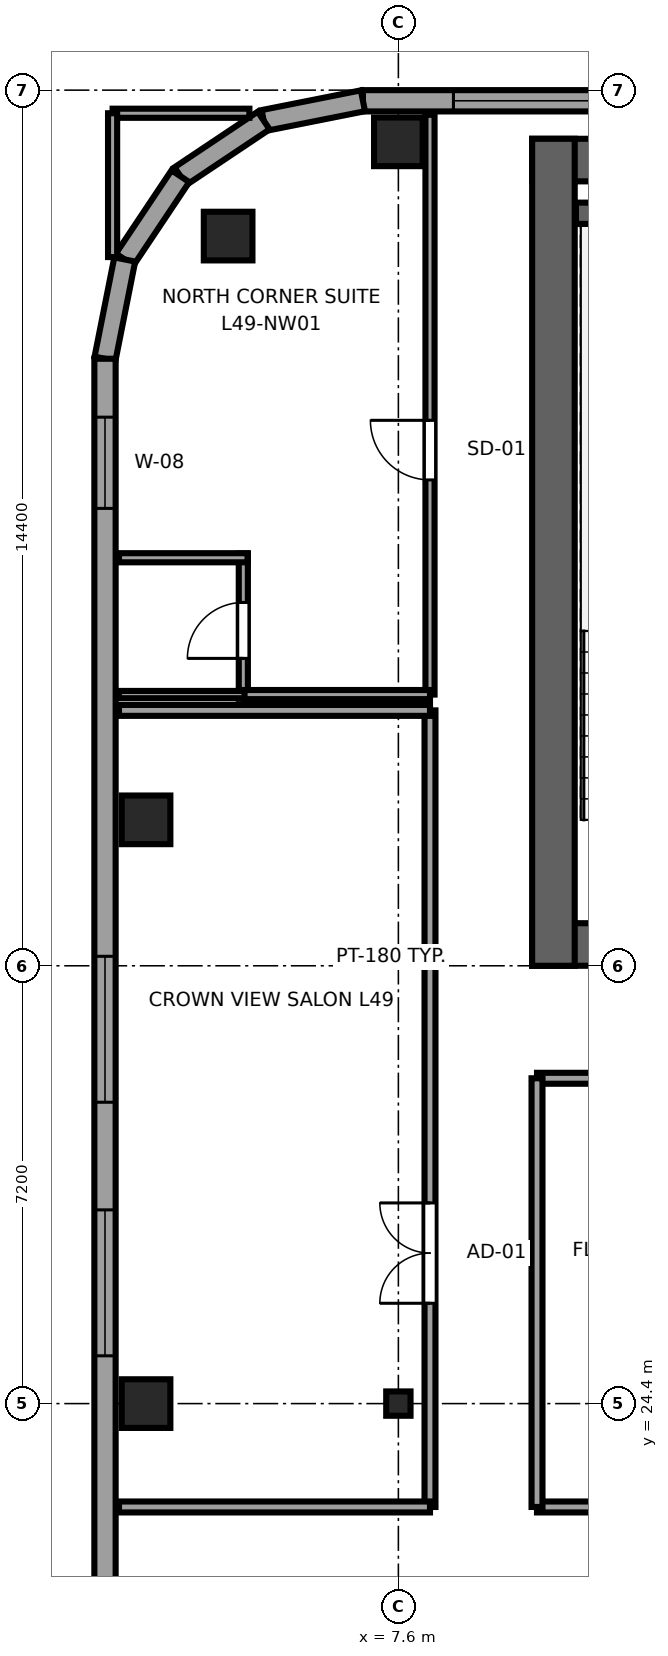
"""IFC4 building model, lengths in metres.
Left out: names, types, materials, properties, quantities, classifications, styles, units other than length and angle.
Written with IfcOpenShell. Run it as: python <this file> out.ifc"""

import sys

from ifc_helpers import new_model, si_unit, direction, frame, frame_2d, origin, origin_2d, place, context, subcontext, project, spatial, rectangle, i_section, extrude, source, transform, mapped, element, fill, save


model = new_model("IFC4")
c1 = context("Model", 3, precision=1e-05, world=origin(), true_north=direction((0.0, 1.0)))
c2 = subcontext(c1, "Body", "Model", "MODEL_VIEW")
j1 = project(units=[si_unit("LENGTHUNIT", "METRE"), si_unit("PLANEANGLEUNIT", "RADIAN")], contexts=[c1])
p1 = place(None, origin())
s1 = spatial("IfcSite", under=j1, at=p1, CompositionType="ELEMENT")
p2 = place(p1, origin())
s2 = spatial("IfcBuilding", under=s1, at=p2, CompositionType="ELEMENT")
p3 = place(p2, frame((0.0, 0.0, 187.55)))
s3 = spatial("IfcBuildingStorey", under=s2, at=p3, CompositionType="ELEMENT", Elevation=187.55)
p4 = place(p3, frame((9.8, 31.95, 0.0), z_axis=(0.0, 0.0, 1.0), x_axis=(1.0, 0.0, 0.0)))
e1 = element("IfcWall", 1, at=p4, inside=s3, PredefinedType="SHEAR", context=c2, shape_type="SweptSolid", body=[
    extrude(rectangle(XDim=26.4, YDim=0.7, at=frame_2d((13.2, 0.0))), origin(), (0.0, 0.0, 1.0), 3.55),
])
p5 = place(p4, frame((6.32, 0.0, 0.0), z_axis=(0.0, 0.0, 1.0), x_axis=(-1.0, 0.0, 0.0)))
e2 = element("IfcOpeningElement", 2, at=p5, cuts=e1, PredefinedType="OPENING", context=c2, shape_type="SweptSolid", body=[
    extrude(rectangle(XDim=1.5, YDim=2.04, at=frame_2d((0.75, 1.02))), frame((0.0, 0.36, 0.0), z_axis=(0.0, -1.0, 0.0), x_axis=(1.0, 0.0, 0.0)), (0.0, 0.0, 1.0), 0.72),
])
p6 = place(p4, frame((13.95, 0.0, 0.0), z_axis=(0.0, 0.0, 1.0), x_axis=(-1.0, 0.0, 0.0)))
e3 = element("IfcOpeningElement", 3, at=p6, cuts=e1, PredefinedType="OPENING", context=c2, shape_type="SweptSolid", body=[
    extrude(rectangle(XDim=1.5, YDim=2.04, at=frame_2d((0.75, 1.02))), frame((0.0, 0.36, 0.0), z_axis=(0.0, -1.0, 0.0), x_axis=(1.0, 0.0, 0.0)), (0.0, 0.0, 1.0), 0.72),
])
p7 = place(p4, frame((20.25, 0.0, 0.0), z_axis=(0.0, 0.0, 1.0), x_axis=(-1.0, 0.0, 0.0)))
e4 = element("IfcOpeningElement", 4, at=p7, cuts=e1, PredefinedType="OPENING", context=c2, shape_type="SweptSolid", body=[
    extrude(rectangle(XDim=1.5, YDim=2.04, at=frame_2d((0.75, 1.02))), frame((0.0, 0.36, 0.0), z_axis=(0.0, -1.0, 0.0), x_axis=(1.0, 0.0, 0.0)), (0.0, 0.0, 1.0), 0.72),
])
p8 = place(p4, frame((8.37, 0.0, 0.0), z_axis=(0.0, 0.0, 1.0), x_axis=(-1.0, 0.0, 0.0)))
e5 = element("IfcOpeningElement", 5, at=p8, cuts=e1, PredefinedType="OPENING", context=c2, shape_type="SweptSolid", body=[
    extrude(rectangle(XDim=0.82, YDim=2.01, at=frame_2d((0.41, 1.005))), frame((0.0, 0.36, 0.0), z_axis=(0.0, -1.0, 0.0), x_axis=(1.0, 0.0, 0.0)), (0.0, 0.0, 1.0), 0.72),
])
p9 = place(p3, frame((9.8, 44.85, 0.0), z_axis=(0.0, 0.0, 1.0), x_axis=(1.0, 0.0, 0.0)))
e6 = element("IfcWall", 6, at=p9, inside=s3, PredefinedType="SHEAR", context=c2, shape_type="SweptSolid", body=[
    extrude(rectangle(XDim=26.4, YDim=0.7, at=frame_2d((13.2, 0.0))), origin(), (0.0, 0.0, 1.0), 3.55),
])
p10 = place(p3, frame((10.15, 31.6, 0.0), z_axis=(0.0, 0.0, 1.0), x_axis=(0.0, 1.0, 0.0)))
e7 = element("IfcWall", 7, at=p10, inside=s3, PredefinedType="SHEAR", context=c2, shape_type="SweptSolid", body=[
    extrude(rectangle(XDim=13.6, YDim=0.7, at=frame_2d((6.8, 0.0))), origin(), (0.0, 0.0, 1.0), 3.55),
])
p11 = place(p3, frame((10.52, 43.975, 0.0), z_axis=(0.0, 0.0, 1.0), x_axis=(1.0, 0.0, 0.0)))
e8 = element("IfcWall", 8, at=p11, inside=s3, PredefinedType="SHEAR", context=c2, shape_type="SweptSolid", body=[
    extrude(rectangle(XDim=3.6, YDim=0.35, at=frame_2d((1.8, 0.0))), origin(), (0.0, 0.0, 1.0), 3.55),
])
m1 = source(origin(), c2, "Body", "SweptSolid", [
    extrude(rectangle(XDim=0.8, YDim=0.8, at=origin_2d()), origin(), (0.0, 0.0, 1.0), 3.55),
])
p12 = place(p3, frame((3.45, 24.4, 0.0), z_axis=(0.0, 0.0, 1.0), x_axis=(1.0, 0.0, 0.0)))
e9 = element("IfcColumn", 9, at=p12, inside=s3, PredefinedType="COLUMN", context=c2, shape_type="MappedRepresentation", body=[
    mapped(m1, transform((0.0, 0.0, 0.0), x_axis=(1.0, 0.0, 0.0), y_axis=(0.0, 1.0, 0.0), z_axis=(0.0, 0.0, 1.0), scale=1.0)),
])
m2 = source(origin(), c2, "Body", "SweptSolid", [
    extrude(i_section(OverallWidth=0.4, OverallDepth=0.4, WebThickness=0.02, FlangeThickness=0.035, at=origin_2d()), origin(), (0.0, 0.0, 1.0), 3.55),
])
p13 = place(p3, frame((7.6, 24.4, 0.0), z_axis=(0.0, 0.0, 1.0), x_axis=(1.0, 0.0, 0.0)))
e10 = element("IfcColumn", 10, at=p13, inside=s3, PredefinedType="COLUMN", context=c2, shape_type="MappedRepresentation", body=[
    mapped(m2, transform((0.0, 0.0, 0.0), x_axis=(1.0, 0.0, 0.0), y_axis=(0.0, 1.0, 0.0), z_axis=(0.0, 0.0, 1.0), scale=1.0)),
])
for number, where, z_axis, x_axis in (
    (11, (4.8, 43.6, 0.0), (0.0, 0.0, 1.0), (1.0, 0.0, 0.0)),
    (12, (7.6, 45.15, 0.0), (0.0, 0.0, 1.0), (1.0, 0.0, 0.0)),
    (13, (3.45, 34.0, 0.0), (0.0, 0.0, 1.0), (1.0, 0.0, 0.0)),
):
    element("IfcColumn", number, at=place(p3, frame(where, z_axis=z_axis, x_axis=x_axis)), inside=s3, PredefinedType="COLUMN", context=c2, shape_type="MappedRepresentation", body=[
        mapped(m1, transform((0.0, 0.0, 0.0), x_axis=(1.0, 0.0, 0.0), y_axis=(0.0, 1.0, 0.0), z_axis=(0.0, 0.0, 1.0), scale=1.0)),
    ])
p14 = place(p3, frame((49.983, 45.825, 0.0), z_axis=(0.0, 0.0, 1.0), x_axis=(-1.0, 0.0, 0.0)))
e14 = element("IfcWall", 14, at=p14, inside=s3, PredefinedType="SOLIDWALL", context=c2, shape_type="SweptSolid", body=[
    extrude(rectangle(XDim=42.966, YDim=0.35, at=frame_2d((21.483, 0.0))), origin(), (0.0, 0.0, 1.0), 3.37),
])
p15 = place(p14, frame((1.488, 0.0, 0.68)))
e15 = element("IfcOpeningElement", 15, at=p15, cuts=e14, PredefinedType="OPENING", context=c2, shape_type="SweptSolid", body=[
    extrude(rectangle(XDim=2.4, YDim=1.9, at=frame_2d((1.2, 0.95))), frame((0.0, 0.185, 0.0), z_axis=(0.0, -1.0, 0.0), x_axis=(1.0, 0.0, 0.0)), (0.0, 0.0, 1.0), 0.37),
])
p16 = place(p14, frame((9.841, 0.0, 0.68)))
e16 = element("IfcOpeningElement", 16, at=p16, cuts=e14, PredefinedType="OPENING", context=c2, shape_type="SweptSolid", body=[
    extrude(rectangle(XDim=2.4, YDim=1.9, at=frame_2d((1.2, 0.95))), frame((0.0, 0.185, 0.0), z_axis=(0.0, -1.0, 0.0), x_axis=(1.0, 0.0, 0.0)), (0.0, 0.0, 1.0), 0.37),
])
p17 = place(p14, frame((14.018, 0.0, 0.68)))
e17 = element("IfcOpeningElement", 17, at=p17, cuts=e14, PredefinedType="OPENING", context=c2, shape_type="SweptSolid", body=[
    extrude(rectangle(XDim=2.4, YDim=1.9, at=frame_2d((1.2, 0.95))), frame((0.0, 0.185, 0.0), z_axis=(0.0, -1.0, 0.0), x_axis=(1.0, 0.0, 0.0)), (0.0, 0.0, 1.0), 0.37),
])
p18 = place(p14, frame((18.195, 0.0, 0.68)))
e18 = element("IfcOpeningElement", 18, at=p18, cuts=e14, PredefinedType="OPENING", context=c2, shape_type="SweptSolid", body=[
    extrude(rectangle(XDim=2.4, YDim=1.9, at=frame_2d((1.2, 0.95))), frame((0.0, 0.185, 0.0), z_axis=(0.0, -1.0, 0.0), x_axis=(1.0, 0.0, 0.0)), (0.0, 0.0, 1.0), 0.37),
])
p19 = place(p14, frame((22.371, 0.0, 0.68)))
e19 = element("IfcOpeningElement", 19, at=p19, cuts=e14, PredefinedType="OPENING", context=c2, shape_type="SweptSolid", body=[
    extrude(rectangle(XDim=2.4, YDim=1.9, at=frame_2d((1.2, 0.95))), frame((0.0, 0.185, 0.0), z_axis=(0.0, -1.0, 0.0), x_axis=(1.0, 0.0, 0.0)), (0.0, 0.0, 1.0), 0.37),
])
p20 = place(p14, frame((26.548, 0.0, 0.68)))
e20 = element("IfcOpeningElement", 20, at=p20, cuts=e14, PredefinedType="OPENING", context=c2, shape_type="SweptSolid", body=[
    extrude(rectangle(XDim=2.4, YDim=1.9, at=frame_2d((1.2, 0.95))), frame((0.0, 0.185, 0.0), z_axis=(0.0, -1.0, 0.0), x_axis=(1.0, 0.0, 0.0)), (0.0, 0.0, 1.0), 0.37),
])
p21 = place(p14, frame((30.724, 0.0, 0.68)))
e21 = element("IfcOpeningElement", 21, at=p21, cuts=e14, PredefinedType="OPENING", context=c2, shape_type="SweptSolid", body=[
    extrude(rectangle(XDim=2.4, YDim=1.9, at=frame_2d((1.2, 0.95))), frame((0.0, 0.185, 0.0), z_axis=(0.0, -1.0, 0.0), x_axis=(1.0, 0.0, 0.0)), (0.0, 0.0, 1.0), 0.37),
])
p22 = place(p14, frame((34.901, 0.0, 0.68)))
e22 = element("IfcOpeningElement", 22, at=p22, cuts=e14, PredefinedType="OPENING", context=c2, shape_type="SweptSolid", body=[
    extrude(rectangle(XDim=2.4, YDim=1.9, at=frame_2d((1.2, 0.95))), frame((0.0, 0.185, 0.0), z_axis=(0.0, -1.0, 0.0), x_axis=(1.0, 0.0, 0.0)), (0.0, 0.0, 1.0), 0.37),
])
p23 = place(p14, frame((39.077, 0.0, 0.68)))
e23 = element("IfcOpeningElement", 23, at=p23, cuts=e14, PredefinedType="OPENING", context=c2, shape_type="SweptSolid", body=[
    extrude(rectangle(XDim=2.4, YDim=1.9, at=frame_2d((1.2, 0.95))), frame((0.0, 0.185, 0.0), z_axis=(0.0, -1.0, 0.0), x_axis=(1.0, 0.0, 0.0)), (0.0, 0.0, 1.0), 0.37),
])
p24 = place(p3, frame((7.017, 45.825, 0.0), z_axis=(0.0, 0.0, 1.0), x_axis=(-0.980788844421, -0.195072403631, 0.0)))
e24 = element("IfcWall", 24, at=p24, inside=s3, PredefinedType="SOLIDWALL", context=c2, shape_type="SweptSolid", body=[
    extrude(rectangle(XDim=1.665, YDim=0.35, at=frame_2d((0.832, 0.0))), origin(), (0.0, 0.0, 1.0), 3.37),
])
for number, where, z_axis, x_axis in (
    (25, (5.385, 45.5, 0.0), (0.0, 0.0, 1.0), (-0.832, -0.556, 0.0)),
    (26, (4.015, 44.585, 0.0), (0.0, 0.0, 1.0), (-0.556, -0.831, 0.0)),
):
    element("IfcWall", number, at=place(p3, frame(where, z_axis=z_axis, x_axis=x_axis)), inside=s3, PredefinedType="SOLIDWALL", context=c2, shape_type="SweptSolid", body=[
        extrude(rectangle(XDim=1.647, YDim=0.35, at=frame_2d((0.824, 0.0))), origin(), (0.0, 0.0, 1.0), 2.832),
    ])
p25 = place(p3, frame((3.1, 43.216, 0.0), z_axis=(0.0, 0.0, 1.0), x_axis=(-0.195044345786, -0.980794424524, 0.0)))
e27 = element("IfcWall", 27, at=p25, inside=s3, PredefinedType="SOLIDWALL", context=c2, shape_type="SweptSolid", body=[
    extrude(rectangle(XDim=1.665, YDim=0.35, at=frame_2d((0.833, 0.0))), origin(), (0.0, 0.0, 1.0), 3.37),
])
p26 = place(p3, frame((2.775, 41.583, 0.0), z_axis=(0.0, 0.0, 1.0), x_axis=(0.0, -1.0, 0.0)))
e28 = element("IfcWall", 28, at=p26, inside=s3, PredefinedType="SOLIDWALL", context=c2, shape_type="SweptSolid", body=[
    extrude(rectangle(XDim=34.566, YDim=0.35, at=frame_2d((17.283, 0.0))), origin(), (0.0, 0.0, 1.0), 3.37),
])
p27 = place(p26, frame((9.827, 0.0, 0.68)))
e29 = element("IfcOpeningElement", 29, at=p27, cuts=e28, PredefinedType="OPENING", context=c2, shape_type="SweptSolid", body=[
    extrude(rectangle(XDim=2.4, YDim=1.9, at=frame_2d((1.2, 0.95))), frame((0.0, 0.185, 0.0), z_axis=(0.0, -1.0, 0.0), x_axis=(1.0, 0.0, 0.0)), (0.0, 0.0, 1.0), 0.37),
])
p28 = place(p26, frame((13.997, 0.0, 0.68)))
e30 = element("IfcOpeningElement", 30, at=p28, cuts=e28, PredefinedType="OPENING", context=c2, shape_type="SweptSolid", body=[
    extrude(rectangle(XDim=2.4, YDim=1.9, at=frame_2d((1.2, 0.95))), frame((0.0, 0.185, 0.0), z_axis=(0.0, -1.0, 0.0), x_axis=(1.0, 0.0, 0.0)), (0.0, 0.0, 1.0), 0.37),
])
p29 = place(p26, frame((22.339, 0.0, 0.68)))
e31 = element("IfcOpeningElement", 31, at=p29, cuts=e28, PredefinedType="OPENING", context=c2, shape_type="SweptSolid", body=[
    extrude(rectangle(XDim=2.4, YDim=1.9, at=frame_2d((1.2, 0.95))), frame((0.0, 0.185, 0.0), z_axis=(0.0, -1.0, 0.0), x_axis=(1.0, 0.0, 0.0)), (0.0, 0.0, 1.0), 0.37),
])
p30 = place(p26, frame((26.51, 0.0, 0.68)))
e32 = element("IfcOpeningElement", 32, at=p30, cuts=e28, PredefinedType="OPENING", context=c2, shape_type="SweptSolid", body=[
    extrude(rectangle(XDim=2.4, YDim=1.9, at=frame_2d((1.2, 0.95))), frame((0.0, 0.185, 0.0), z_axis=(0.0, -1.0, 0.0), x_axis=(1.0, 0.0, 0.0)), (0.0, 0.0, 1.0), 0.37),
])
p31 = place(p26, frame((31.433, 0.0, 0.62)))
e33 = element("IfcOpeningElement", 33, at=p31, cuts=e28, PredefinedType="OPENING", context=c2, shape_type="SweptSolid", body=[
    extrude(rectangle(XDim=1.5, YDim=1.55, at=frame_2d((0.75, 0.775))), frame((0.0, 0.185, 0.0), z_axis=(0.0, -1.0, 0.0), x_axis=(1.0, 0.0, 0.0)), (0.0, 0.0, 1.0), 0.37),
])
p32 = place(p26, frame((0.961, 0.0, 0.62)))
e34 = element("IfcOpeningElement", 34, at=p32, cuts=e28, PredefinedType="OPENING", context=c2, shape_type="SweptSolid", body=[
    extrude(rectangle(XDim=1.5, YDim=1.55, at=frame_2d((0.75, 0.775))), frame((0.0, 0.185, 0.0), z_axis=(0.0, -1.0, 0.0), x_axis=(1.0, 0.0, 0.0)), (0.0, 0.0, 1.0), 0.37),
])
p33 = place(p3, frame((5.05, 35.99, 0.0), z_axis=(0.0, 0.0, 1.0), x_axis=(0.0, 1.0, 0.0)))
e35 = element("IfcWall", 35, at=p33, inside=s3, PredefinedType="PARTITIONING", context=c2, shape_type="SweptSolid", body=[
    extrude(rectangle(XDim=2.39, YDim=0.15, at=frame_2d((1.195, 0.0))), origin(), (0.0, 0.0, 1.0), 3.37),
])
p34 = place(p33, frame((0.665, 0.0, 0.0)))
e36 = element("IfcOpeningElement", 36, at=p34, cuts=e35, PredefinedType="OPENING", context=c2, shape_type="SweptSolid", body=[
    extrude(rectangle(XDim=0.92, YDim=2.01, at=frame_2d((0.46, 1.005))), frame((0.0, 0.085, 0.0), z_axis=(0.0, -1.0, 0.0), x_axis=(1.0, 0.0, 0.0)), (0.0, 0.0, 1.0), 0.17),
])
p35 = place(p3, frame((3.005, 36.06, 0.0), z_axis=(0.0, 0.0, 1.0), x_axis=(1.0, 0.0, 0.0)))
e37 = element("IfcWall", 37, at=p35, inside=s3, PredefinedType="PLUMBINGWALL", context=c2, shape_type="SweptSolid", body=[
    extrude(rectangle(XDim=2.115, YDim=0.12, at=frame_2d((1.058, 0.0))), origin(), (0.0, 0.0, 1.0), 3.37),
])
p36 = place(p3, frame((3.005, 38.31, 0.0), z_axis=(0.0, 0.0, 1.0), x_axis=(1.0, 0.0, 0.0)))
e38 = element("IfcWall", 38, at=p36, inside=s3, PredefinedType="PARTITIONING", context=c2, shape_type="SweptSolid", body=[
    extrude(rectangle(XDim=2.115, YDim=0.15, at=frame_2d((1.058, 0.0))), origin(), (0.0, 0.0, 1.0), 3.37),
])
p37 = place(p3, frame((8.12, 22.7, 0.0), z_axis=(0.0, 0.0, 1.0), x_axis=(0.0, 1.0, 0.0)))
e39 = element("IfcWall", 39, at=p37, inside=s3, PredefinedType="PARTITIONING", context=c2, shape_type="SweptSolid", body=[
    extrude(rectangle(XDim=13.1, YDim=0.18, at=frame_2d((6.55, 0.0))), origin(), (0.0, 0.0, 1.0), 3.37),
])
p38 = place(p37, frame((3.35, 0.0, 0.0)))
e40 = element("IfcOpeningElement", 40, at=p38, cuts=e39, PredefinedType="OPENING", context=c2, shape_type="SweptSolid", body=[
    extrude(rectangle(XDim=1.65, YDim=2.15, at=frame_2d((0.825, 1.075))), frame((0.0, 0.1, 0.0), z_axis=(0.0, -1.0, 0.0), x_axis=(1.0, 0.0, 0.0)), (0.0, 0.0, 1.0), 0.2),
])
for number, where, z_axis, x_axis in (
    (41, (3.005, 22.7, 0.0), (0.0, 0.0, 1.0), (1.0, 0.0, 0.0)),
    (42, (3.005, 35.8, 0.0), (0.0, 0.0, 1.0), (1.0, 0.0, 0.0)),
):
    element("IfcWall", number, at=place(p3, frame(where, z_axis=z_axis, x_axis=x_axis)), inside=s3, PredefinedType="PARTITIONING", context=c2, shape_type="SweptSolid", body=[
        extrude(rectangle(XDim=5.115, YDim=0.18, at=frame_2d((2.558, 0.0))), origin(), (0.0, 0.0, 1.0), 3.37),
    ])
p39 = place(p3, frame((8.12, 36.06, 0.0), z_axis=(0.0, 0.0, 1.0), x_axis=(0.0, 1.0, 0.0)))
e43 = element("IfcWall", 43, at=p39, inside=s3, PredefinedType="PARTITIONING", context=c2, shape_type="SweptSolid", body=[
    extrude(rectangle(XDim=9.535, YDim=0.15, at=frame_2d((4.768, 0.0))), origin(), (0.0, 0.0, 1.0), 3.37),
])
p40 = place(p39, frame((3.53, 0.0, 0.0)))
e44 = element("IfcOpeningElement", 44, at=p40, cuts=e43, PredefinedType="OPENING", context=c2, shape_type="SweptSolid", body=[
    extrude(rectangle(XDim=0.98, YDim=2.12, at=frame_2d((0.49, 1.06))), frame((0.0, 0.085, 0.0), z_axis=(0.0, -1.0, 0.0), x_axis=(1.0, 0.0, 0.0)), (0.0, 0.0, 1.0), 0.17),
])
p41 = place(p3, frame((5.07, 36.06, 0.0), z_axis=(0.0, 0.0, 1.0), x_axis=(1.0, 0.0, 0.0)))
e45 = element("IfcWall", 45, at=p41, inside=s3, PredefinedType="PARTITIONING", context=c2, shape_type="SweptSolid", body=[
    extrude(rectangle(XDim=3.05, YDim=0.15, at=frame_2d((1.525, 0.0))), origin(), (0.0, 0.0, 1.0), 3.37),
])
p42 = place(p3, frame((2.9, 45.62, 0.0), z_axis=(0.0, 0.0, 1.0), x_axis=(1.0, 0.0, 0.0)))
e46 = element("IfcWall", 46, at=p42, inside=s3, PredefinedType="PARTITIONING", context=c2, shape_type="SweptSolid", body=[
    extrude(rectangle(XDim=2.25, YDim=0.15, at=frame_2d((1.125, 0.0))), origin(), (0.0, 0.0, 1.0), 3.37),
])
p43 = place(p3, frame((2.9, 43.255, 0.0), z_axis=(0.0, 0.0, 1.0), x_axis=(0.0, 1.0, 0.0)))
e47 = element("IfcWall", 47, at=p43, inside=s3, PredefinedType="PARTITIONING", context=c2, shape_type="SweptSolid", body=[
    extrude(rectangle(XDim=2.365, YDim=0.15, at=frame_2d((1.183, 0.0))), origin(), (0.0, 0.0, 1.0), 3.37),
])
p44 = place(p3, frame((9.88, 22.7, 0.0), z_axis=(0.0, 0.0, 1.0), x_axis=(1.0, 0.0, 0.0)))
e48 = element("IfcWall", 48, at=p44, inside=s3, PredefinedType="PARTITIONING", context=c2, shape_type="SweptSolid", body=[
    extrude(rectangle(XDim=4.22, YDim=0.18, at=frame_2d((2.11, 0.0))), origin(), (0.0, 0.0, 1.0), 3.37),
])
p45 = place(p44, frame((1.285, 0.0, 0.0)))
e49 = element("IfcOpeningElement", 49, at=p45, cuts=e48, PredefinedType="OPENING", context=c2, shape_type="SweptSolid", body=[
    extrude(rectangle(XDim=1.65, YDim=2.15, at=frame_2d((0.825, 1.075))), frame((0.0, 0.1, 0.0), z_axis=(0.0, -1.0, 0.0), x_axis=(1.0, 0.0, 0.0)), (0.0, 0.0, 1.0), 0.2),
])
p46 = place(p3, frame((9.88, 29.75, 0.0), z_axis=(0.0, 0.0, 1.0), x_axis=(1.0, 0.0, 0.0)))
e50 = element("IfcWall", 50, at=p46, inside=s3, PredefinedType="PARTITIONING", context=c2, shape_type="SweptSolid", body=[
    extrude(rectangle(XDim=4.22, YDim=0.18, at=frame_2d((2.11, 0.0))), origin(), (0.0, 0.0, 1.0), 3.37),
])
p47 = place(p3, frame((9.88, 22.7, 0.0), z_axis=(0.0, 0.0, 1.0), x_axis=(0.0, 1.0, 0.0)))
e51 = element("IfcWall", 51, at=p47, inside=s3, PredefinedType="PARTITIONING", context=c2, shape_type="SweptSolid", body=[
    extrude(rectangle(XDim=7.05, YDim=0.18, at=frame_2d((3.525, 0.0))), origin(), (0.0, 0.0, 1.0), 3.37),
])
m3 = source(origin(), c2, "Body", "SweptSolid", [
    extrude(rectangle(XDim=2.4, YDim=1.9, at=frame_2d((1.2, 0.95))), frame((0.0, 0.09, 0.0), z_axis=(0.0, -1.0, 0.0), x_axis=(1.0, 0.0, 0.0)), (0.0, 0.0, 1.0), 0.06),
])
p48 = place(p23, origin())
e52 = element("IfcWindow", 52, at=p48, inside=s3, PartitioningType="TRIPLE_PANEL_HORIZONTAL", PredefinedType="WINDOW", context=c2, shape_type="MappedRepresentation", body=[
    mapped(m3, transform((0.0, 0.0, 0.0), x_axis=(1.0, 0.0, 0.0), y_axis=(0.0, 1.0, 0.0), z_axis=(0.0, 0.0, 1.0), scale=1.0)),
])
fill(e23, e52)
p49 = place(p27, origin())
e53 = element("IfcWindow", 53, at=p49, inside=s3, PartitioningType="TRIPLE_PANEL_HORIZONTAL", PredefinedType="WINDOW", context=c2, shape_type="MappedRepresentation", body=[
    mapped(m3, transform((0.0, 0.0, 0.0), x_axis=(1.0, 0.0, 0.0), y_axis=(0.0, 1.0, 0.0), z_axis=(0.0, 0.0, 1.0), scale=1.0)),
])
fill(e29, e53)
p50 = place(p28, origin())
e54 = element("IfcWindow", 54, at=p50, inside=s3, PartitioningType="TRIPLE_PANEL_HORIZONTAL", PredefinedType="WINDOW", context=c2, shape_type="MappedRepresentation", body=[
    mapped(m3, transform((0.0, 0.0, 0.0), x_axis=(1.0, 0.0, 0.0), y_axis=(0.0, 1.0, 0.0), z_axis=(0.0, 0.0, 1.0), scale=1.0)),
])
fill(e30, e54)
m4 = source(origin(), c2, "Body", "SweptSolid", [
    extrude(rectangle(XDim=1.5, YDim=1.55, at=frame_2d((0.75, 0.775))), frame((0.0, 0.09, 0.0), z_axis=(0.0, -1.0, 0.0), x_axis=(1.0, 0.0, 0.0)), (0.0, 0.0, 1.0), 0.06),
])
p51 = place(p32, origin())
e55 = element("IfcWindow", 55, at=p51, inside=s3, PartitioningType="SINGLE_PANEL", PredefinedType="WINDOW", context=c2, shape_type="MappedRepresentation", body=[
    mapped(m4, transform((0.0, 0.0, 0.0), x_axis=(1.0, 0.0, 0.0), y_axis=(0.0, 1.0, 0.0), z_axis=(0.0, 0.0, 1.0), scale=1.0)),
])
fill(e34, e55)
m5 = source(origin(), c2, "Body", "SweptSolid", [
    extrude(rectangle(XDim=0.92, YDim=2.01, at=frame_2d((0.46, 1.005))), frame((0.0, 0.025, 0.0), z_axis=(0.0, -1.0, 0.0), x_axis=(1.0, 0.0, 0.0)), (0.0, 0.0, 1.0), 0.05),
])
p52 = place(p34, origin())
e56 = element("IfcDoor", 56, at=p52, inside=s3, OperationType="SINGLE_SWING_LEFT", PredefinedType="DOOR", context=c2, shape_type="MappedRepresentation", body=[
    mapped(m5, transform((0.0, 0.0, 0.0), x_axis=(1.0, 0.0, 0.0), y_axis=(0.0, 1.0, 0.0), z_axis=(0.0, 0.0, 1.0), scale=1.0)),
])
fill(e36, e56)
m6 = source(origin(), c2, "Body", "SweptSolid", [
    extrude(rectangle(XDim=1.65, YDim=2.15, at=frame_2d((0.825, 1.075))), frame((0.0, 0.025, 0.0), z_axis=(0.0, -1.0, 0.0), x_axis=(1.0, 0.0, 0.0)), (0.0, 0.0, 1.0), 0.05),
])
p53 = place(p38, origin())
e57 = element("IfcDoor", 57, at=p53, inside=s3, OperationType="DOUBLE_DOOR_SINGLE_SWING", PredefinedType="DOOR", context=c2, shape_type="MappedRepresentation", body=[
    mapped(m6, transform((0.0, 0.0, 0.0), x_axis=(1.0, 0.0, 0.0), y_axis=(0.0, 1.0, 0.0), z_axis=(0.0, 0.0, 1.0), scale=1.0)),
])
fill(e40, e57)
m7 = source(origin(), c2, "Body", "SweptSolid", [
    extrude(rectangle(XDim=0.98, YDim=2.12, at=frame_2d((0.49, 1.06))), frame((0.0, 0.025, 0.0), z_axis=(0.0, -1.0, 0.0), x_axis=(1.0, 0.0, 0.0)), (0.0, 0.0, 1.0), 0.05),
])
p54 = place(p40, origin())
e58 = element("IfcDoor", 58, at=p54, inside=s3, OperationType="SINGLE_SWING_RIGHT", PredefinedType="DOOR", context=c2, shape_type="MappedRepresentation", body=[
    mapped(m7, transform((0.0, 0.0, 0.0), x_axis=(1.0, 0.0, 0.0), y_axis=(0.0, 1.0, 0.0), z_axis=(0.0, 0.0, 1.0), scale=1.0)),
])
fill(e44, e58)
save(model, sys.argv[1])
